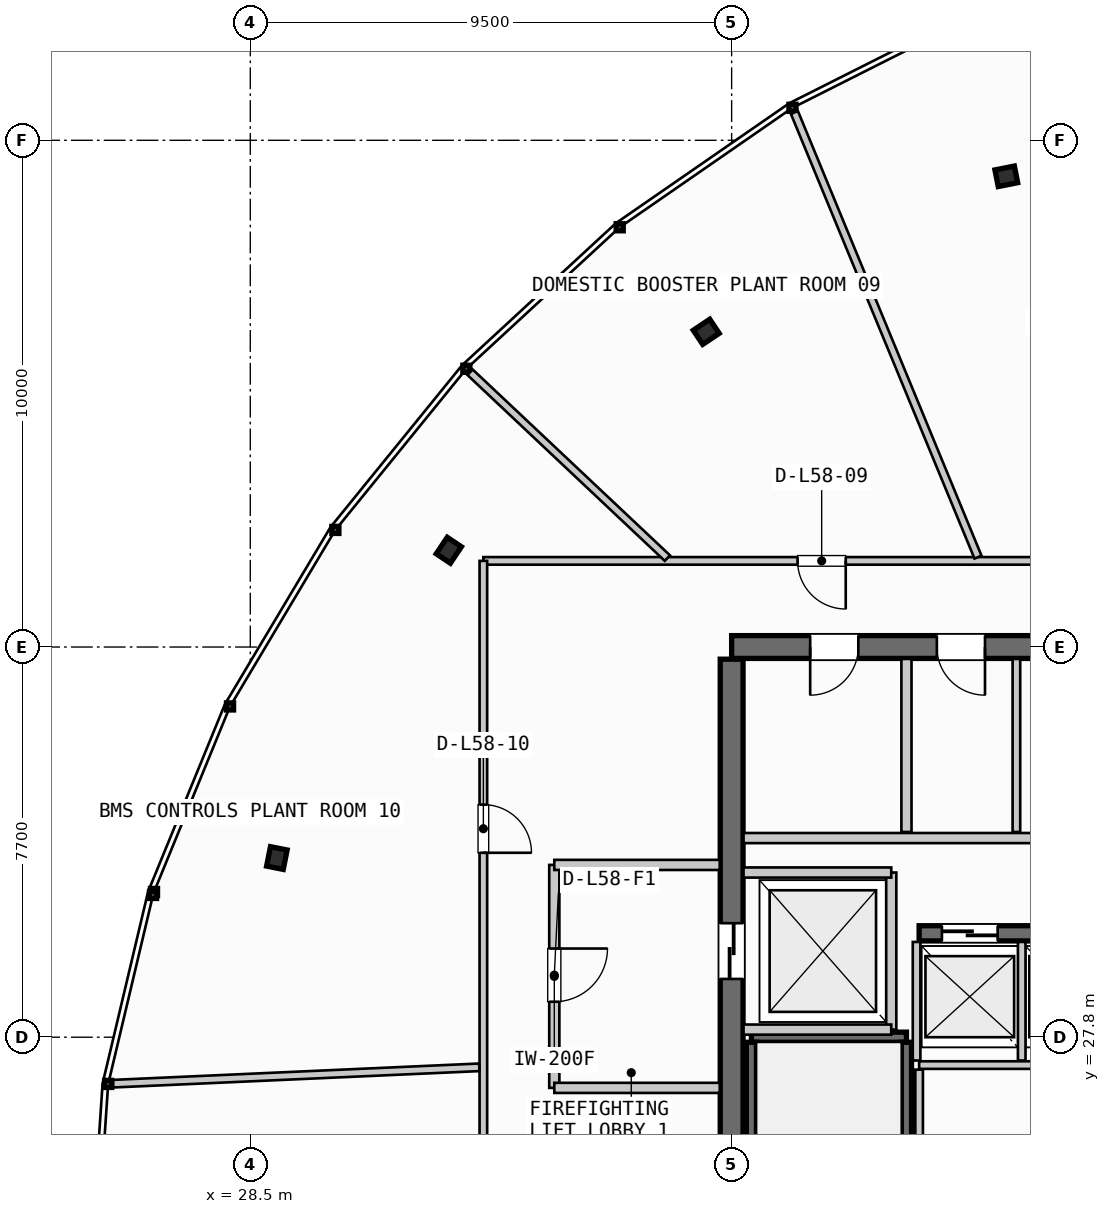
"""IFC4 building model, lengths in metres.
Left out: names, types, materials, properties, quantities, classifications, styles, units other than length and angle.
Written with IfcOpenShell. Run it as: python <this file> out.ifc"""

import sys

from ifc_helpers import new_model, si_unit, direction, frame, frame_2d, origin, origin_2d, place, context, subcontext, project, spatial, rectangle, i_section, extrude, source, transform, mapped, element, fill, save


model = new_model("IFC4")
c1 = context("Model", 3, precision=1e-05, world=origin(), true_north=direction((0.0, 1.0)))
c2 = subcontext(c1, "Body", "Model", "MODEL_VIEW")
j1 = project(units=[si_unit("LENGTHUNIT", "METRE"), si_unit("PLANEANGLEUNIT", "RADIAN")], contexts=[c1])
p1 = place(None, origin())
s1 = spatial("IfcSite", under=j1, at=p1, CompositionType="ELEMENT")
p2 = place(p1, origin())
s2 = spatial("IfcBuilding", under=s1, at=p2, CompositionType="ELEMENT")
p3 = place(p2, frame((0.0, 0.0, 223.6)))
s3 = spatial("IfcBuildingStorey", under=s2, at=p3, CompositionType="ELEMENT", Elevation=223.6)
p4 = place(p3, frame((55.6, 35.5, 0.0), z_axis=(0.0, 0.0, 1.0), x_axis=(-1.0, 0.0, 0.0)))
e1 = element("IfcWall", 1, at=p4, inside=s3, PredefinedType="SHEAR", context=c2, shape_type="SweptSolid", body=[
    extrude(rectangle(XDim=17.6, YDim=0.45, at=frame_2d((8.8, 0.0))), origin(), (0.0, 0.0, 1.0), 4.38),
])
p5 = place(p4, frame((8.05, 0.0, 0.0)))
e2 = element("IfcOpeningElement", 2, at=p5, cuts=e1, PredefinedType="OPENING", context=c2, shape_type="SweptSolid", body=[
    extrude(rectangle(XDim=1.5, YDim=2.2, at=frame_2d((0.75, 1.1))), frame((0.0, 0.235, 0.0), z_axis=(0.0, -1.0, 0.0), x_axis=(1.0, 0.0, 0.0)), (0.0, 0.0, 1.0), 0.47),
])
p6 = place(p4, frame((15.1, 0.0, 0.0)))
e3 = element("IfcOpeningElement", 3, at=p6, cuts=e1, PredefinedType="OPENING", context=c2, shape_type="SweptSolid", body=[
    extrude(rectangle(XDim=0.95, YDim=2.15, at=frame_2d((0.475, 1.075))), frame((0.0, 0.235, 0.0), z_axis=(0.0, -1.0, 0.0), x_axis=(1.0, 0.0, 0.0)), (0.0, 0.0, 1.0), 0.47),
])
p7 = place(p4, frame((12.6, 0.0, 0.0)))
e4 = element("IfcOpeningElement", 4, at=p7, cuts=e1, PredefinedType="OPENING", context=c2, shape_type="SweptSolid", body=[
    extrude(rectangle(XDim=0.95, YDim=2.15, at=frame_2d((0.475, 1.075))), frame((0.0, 0.235, 0.0), z_axis=(0.0, -1.0, 0.0), x_axis=(1.0, 0.0, 0.0)), (0.0, 0.0, 1.0), 0.47),
])
p8 = place(p4, frame((10.45, 0.0, 0.0)))
e5 = element("IfcOpeningElement", 5, at=p8, cuts=e1, PredefinedType="OPENING", context=c2, shape_type="SweptSolid", body=[
    extrude(rectangle(XDim=0.95, YDim=2.15, at=frame_2d((0.475, 1.075))), frame((0.0, 0.235, 0.0), z_axis=(0.0, -1.0, 0.0), x_axis=(1.0, 0.0, 0.0)), (0.0, 0.0, 1.0), 0.47),
])
p9 = place(p3, frame((38.0, 35.26, 0.0), z_axis=(0.0, 0.0, 1.0), x_axis=(0.0, -1.0, 0.0)))
e6 = element("IfcWall", 6, at=p9, inside=s3, PredefinedType="SHEAR", context=c2, shape_type="SweptSolid", body=[
    extrude(rectangle(XDim=14.92, YDim=0.45, at=frame_2d((7.46, 0.0))), origin(), (0.0, 0.0, 1.0), 4.38),
])
p10 = place(p9, frame((5.21, 0.0, 0.0)))
e7 = element("IfcOpeningElement", 7, at=p10, cuts=e6, PredefinedType="OPENING", context=c2, shape_type="SweptSolid", body=[
    extrude(rectangle(XDim=1.1, YDim=2.2, at=frame_2d((0.55, 1.1))), frame((0.0, 0.235, 0.0), z_axis=(0.0, -1.0, 0.0), x_axis=(1.0, 0.0, 0.0)), (0.0, 0.0, 1.0), 0.47),
])
p11 = place(p3, frame((41.7, 29.85, 0.0), z_axis=(0.0, 0.0, 1.0), x_axis=(1.0, 0.0, 0.0)))
e8 = element("IfcWall", 8, at=p11, inside=s3, PredefinedType="SHEAR", context=c2, shape_type="SweptSolid", body=[
    extrude(rectangle(XDim=4.25, YDim=0.3, at=frame_2d((2.125, 0.0))), origin(), (0.0, 0.0, 1.0), 4.38),
])
p12 = place(p11, frame((0.45, 0.0, 0.0)))
e9 = element("IfcOpeningElement", 9, at=p12, cuts=e8, PredefinedType="OPENING", context=c2, shape_type="SweptSolid", body=[
    extrude(rectangle(XDim=1.1, YDim=2.2, at=frame_2d((0.55, 1.1))), frame((0.0, 0.16, 0.0), z_axis=(0.0, -1.0, 0.0), x_axis=(1.0, 0.0, 0.0)), (0.0, 0.0, 1.0), 0.32),
])
p13 = place(p11, frame((2.5, 0.0, 0.0)))
e10 = element("IfcOpeningElement", 10, at=p13, cuts=e8, PredefinedType="OPENING", context=c2, shape_type="SweptSolid", body=[
    extrude(rectangle(XDim=1.1, YDim=2.2, at=frame_2d((0.55, 1.1))), frame((0.0, 0.16, 0.0), z_axis=(0.0, -1.0, 0.0), x_axis=(1.0, 0.0, 0.0)), (0.0, 0.0, 1.0), 0.32),
])
m1 = source(origin(), c2, "Body", "SweptSolid", [
    extrude(i_section(OverallWidth=0.391, OverallDepth=0.335, WebThickness=0.023, FlangeThickness=0.034, FilletRadius=0.015, at=origin_2d()), origin(), (0.0, 0.0, 1.0), 4.38),
])
for number, where, z_axis, x_axis in (
    (11, (43.421, 44.789, 0.0), (0.0, 0.0, 1.0), (-0.195, 0.981, 0.0)),
    (12, (37.499, 41.72, 0.0), (0.0, 0.0, 1.0), (-0.556, 0.831, 0.0)),
    (13, (32.418, 37.409, 0.0), (0.0, 0.0, 1.0), (-0.831, 0.556, 0.0)),
    (14, (29.025, 31.336, 0.0), (0.0, 0.0, 1.0), (-0.981, 0.195, 0.0)),
):
    element("IfcColumn", number, at=place(p3, frame(where, z_axis=z_axis, x_axis=x_axis)), inside=s3, PredefinedType="COLUMN", context=c2, shape_type="MappedRepresentation", body=[
        mapped(m1, transform((0.0, 0.0, 0.0), scale=1.0)),
    ])
p14 = place(p3, frame((38.39, 27.8, 0.0), z_axis=(0.0, 0.0, 1.0), x_axis=(1.0, 0.0, 0.0)))
e15 = element("IfcWall", 15, at=p14, inside=s3, PredefinedType="SHEAR", context=c2, shape_type="SweptSolid", body=[
    extrude(rectangle(XDim=3.06, YDim=0.2, at=frame_2d((1.53, 0.0))), origin(), (0.0, 0.0, 1.0), 4.38),
])
for number, where, z_axis, x_axis in (
    (16, (41.45, 27.7, 0.0), (0.0, 0.0, 1.0), (0.0, -1.0, 0.0)),
    (17, (38.39, 20.35, 0.0), (0.0, 0.0, 1.0), (0.0, 1.0, 0.0)),
):
    element("IfcWall", number, at=place(p3, frame(where, z_axis=z_axis, x_axis=x_axis)), inside=s3, PredefinedType="SHEAR", context=c2, shape_type="SweptSolid", body=[
        extrude(rectangle(XDim=7.35, YDim=0.2, at=frame_2d((3.675, 0.0))), origin(), (0.0, 0.0, 1.0), 4.38),
    ])
p15 = place(p3, frame((41.15, 27.95, 0.0), z_axis=(0.0, 0.0, 1.0), x_axis=(0.0, 1.0, 0.0)))
e18 = element("IfcWall", 18, at=p15, inside=s3, PredefinedType="PARTITIONING", context=c2, shape_type="SweptSolid", body=[
    extrude(rectangle(XDim=3.1, YDim=0.2, at=frame_2d((1.55, 0.0))), origin(), (0.0, 0.0, 1.0), 2.455),
])
for number, where, z_axis, x_axis in (
    (19, (38.235, 27.95, 0.0), (0.0, 0.0, 1.0), (1.0, 0.0, 0.0)),
    (20, (38.235, 31.05, 0.0), (0.0, 0.0, 1.0), (1.0, 0.0, 0.0)),
):
    element("IfcWall", number, at=place(p3, frame(where, z_axis=z_axis, x_axis=x_axis)), inside=s3, PredefinedType="PARTITIONING", context=c2, shape_type="SweptSolid", body=[
        extrude(rectangle(XDim=2.915, YDim=0.2, at=frame_2d((1.458, 0.0))), origin(), (0.0, 0.0, 1.0), 2.455),
    ])
p16 = place(p3, frame((34.5, 31.2, 0.0), z_axis=(0.0, 0.0, 1.0), x_axis=(0.0, -1.0, 0.0)))
e21 = element("IfcWall", 21, at=p16, inside=s3, PredefinedType="PARTITIONING", context=c2, shape_type="SweptSolid", body=[
    extrude(rectangle(XDim=4.4, YDim=0.2, at=frame_2d((2.2, 0.0))), origin(), (0.0, 0.0, 1.0), 2.455),
])
p17 = place(p16, frame((1.65, 0.0, 0.0)))
e22 = element("IfcOpeningElement", 22, at=p17, cuts=e21, PredefinedType="OPENING", context=c2, shape_type="SweptSolid", body=[
    extrude(rectangle(XDim=1.05, YDim=2.15, at=frame_2d((0.525, 1.075))), frame((0.0, 0.11, 0.0), z_axis=(0.0, -1.0, 0.0), x_axis=(1.0, 0.0, 0.0)), (0.0, 0.0, 1.0), 0.22),
])
for number, where, z_axis, x_axis in (
    (23, (34.5, 26.8, 0.0), (0.0, 0.0, 1.0), (1.0, 0.0, 0.0)),
    (24, (34.5, 31.2, 0.0), (0.0, 0.0, 1.0), (1.0, 0.0, 0.0)),
):
    element("IfcWall", number, at=place(p3, frame(where, z_axis=z_axis, x_axis=x_axis)), inside=s3, PredefinedType="PARTITIONING", context=c2, shape_type="SweptSolid", body=[
        extrude(rectangle(XDim=3.265, YDim=0.2, at=frame_2d((1.632, 0.0))), origin(), (0.0, 0.0, 1.0), 2.455),
    ])
p18 = place(p3, frame((41.7, 27.25, 0.0), z_axis=(0.0, 0.0, 1.0), x_axis=(1.0, 0.0, 0.0)))
e25 = element("IfcWall", 25, at=p18, inside=s3, PredefinedType="PARTITIONING", context=c2, shape_type="SweptSolid", body=[
    extrude(rectangle(XDim=4.25, YDim=0.15, at=frame_2d((2.125, 0.0))), origin(), (0.0, 0.0, 1.0), 2.455),
])
p19 = place(p3, frame((41.7, 24.92, 0.0), z_axis=(0.0, 0.0, 1.0), x_axis=(0.0, 1.0, 0.0)))
e26 = element("IfcWall", 26, at=p19, inside=s3, PredefinedType="PARTITIONING", context=c2, shape_type="SweptSolid", body=[
    extrude(rectangle(XDim=2.24, YDim=0.15, at=frame_2d((1.12, 0.0))), origin(), (0.0, 0.0, 1.0), 2.455),
])
for number, where, z_axis, x_axis in (
    (27, (41.65, 27.34, 0.0), (0.0, 0.0, 1.0), (0.0, 1.0, 0.0)),
    (28, (43.725, 27.34, 0.0), (0.0, 0.0, 1.0), (0.0, 1.0, 0.0)),
):
    element("IfcWall", number, at=place(p3, frame(where, z_axis=z_axis, x_axis=x_axis)), inside=s3, PredefinedType="PARTITIONING", context=c2, shape_type="SweptSolid", body=[
        extrude(rectangle(XDim=2.34, YDim=0.15, at=frame_2d((1.17, 0.0))), origin(), (0.0, 0.0, 1.0), 2.455),
    ])
p20 = place(p3, frame((41.45, 31.85, 0.0), z_axis=(0.0, 0.0, 1.0), x_axis=(0.0, 1.0, 0.0)))
e29 = element("IfcWall", 29, at=p20, inside=s3, PredefinedType="PARTITIONING", context=c2, shape_type="SweptSolid", body=[
    extrude(rectangle(XDim=3.415, YDim=0.2, at=frame_2d((1.708, 0.0))), origin(), (0.0, 0.0, 1.0), 2.455),
])
p21 = place(p3, frame((38.235, 31.73, 0.0), z_axis=(0.0, 0.0, 1.0), x_axis=(1.0, 0.0, 0.0)))
e30 = element("IfcWall", 30, at=p21, inside=s3, PredefinedType="PARTITIONING", context=c2, shape_type="SweptSolid", body=[
    extrude(rectangle(XDim=7.565, YDim=0.2, at=frame_2d((3.782, 0.0))), origin(), (0.0, 0.0, 1.0), 2.455),
])
p22 = place(p3, frame((43.62, 31.85, 0.0), z_axis=(0.0, 0.0, 1.0), x_axis=(0.0, 1.0, 0.0)))
e31 = element("IfcWall", 31, at=p22, inside=s3, PredefinedType="PLUMBINGWALL", context=c2, shape_type="SweptSolid", body=[
    extrude(rectangle(XDim=3.415, YDim=0.15, at=frame_2d((1.708, 0.0))), origin(), (0.0, 0.0, 1.0), 2.455),
])
p23 = place(p3, frame((60.5, 37.2, 0.0), z_axis=(0.0, 0.0, 1.0), x_axis=(-1.0, 0.0, 0.0)))
e32 = element("IfcWall", 32, at=p23, inside=s3, PredefinedType="PARTITIONING", context=c2, shape_type="SweptSolid", body=[
    extrude(rectangle(XDim=27.4, YDim=0.15, at=frame_2d((13.7, 0.0))), origin(), (0.0, 0.0, 1.0), 2.455),
])
p24 = place(p23, frame((4.218, 0.0, 0.0)))
e33 = element("IfcOpeningElement", 33, at=p24, cuts=e32, PredefinedType="OPENING", context=c2, shape_type="SweptSolid", body=[
    extrude(rectangle(XDim=0.95, YDim=2.15, at=frame_2d((0.475, 1.075))), frame((0.0, 0.085, 0.0), z_axis=(0.0, -1.0, 0.0), x_axis=(1.0, 0.0, 0.0)), (0.0, 0.0, 1.0), 0.17),
])
p25 = place(p23, frame((12.726, 0.0, 0.0)))
e34 = element("IfcOpeningElement", 34, at=p25, cuts=e32, PredefinedType="OPENING", context=c2, shape_type="SweptSolid", body=[
    extrude(rectangle(XDim=0.95, YDim=2.15, at=frame_2d((0.475, 1.075))), frame((0.0, 0.085, 0.0), z_axis=(0.0, -1.0, 0.0), x_axis=(1.0, 0.0, 0.0)), (0.0, 0.0, 1.0), 0.17),
])
p26 = place(p23, frame((20.248, 0.0, 0.0)))
e35 = element("IfcOpeningElement", 35, at=p26, cuts=e32, PredefinedType="OPENING", context=c2, shape_type="SweptSolid", body=[
    extrude(rectangle(XDim=0.95, YDim=2.15, at=frame_2d((0.475, 1.075))), frame((0.0, 0.085, 0.0), z_axis=(0.0, -1.0, 0.0), x_axis=(1.0, 0.0, 0.0)), (0.0, 0.0, 1.0), 0.17),
])
p27 = place(p3, frame((33.1, 37.2, 0.0), z_axis=(0.0, 0.0, 1.0), x_axis=(0.0, -1.0, 0.0)))
e36 = element("IfcWall", 36, at=p27, inside=s3, PredefinedType="PARTITIONING", context=c2, shape_type="SweptSolid", body=[
    extrude(rectangle(XDim=18.8, YDim=0.15, at=frame_2d((9.4, 0.0))), origin(), (0.0, 0.0, 1.0), 2.455),
])
p28 = place(p27, frame((13.63, 0.0, 0.0)))
e37 = element("IfcOpeningElement", 37, at=p28, cuts=e36, PredefinedType="OPENING", context=c2, shape_type="SweptSolid", body=[
    extrude(rectangle(XDim=0.95, YDim=2.15, at=frame_2d((0.475, 1.075))), frame((0.0, 0.085, 0.0), z_axis=(0.0, -1.0, 0.0), x_axis=(1.0, 0.0, 0.0)), (0.0, 0.0, 1.0), 0.17),
])
p29 = place(p27, frame((4.81, 0.0, 0.0)))
e38 = element("IfcOpeningElement", 38, at=p29, cuts=e36, PredefinedType="OPENING", context=c2, shape_type="SweptSolid", body=[
    extrude(rectangle(XDim=0.95, YDim=2.15, at=frame_2d((0.475, 1.075))), frame((0.0, 0.085, 0.0), z_axis=(0.0, -1.0, 0.0), x_axis=(1.0, 0.0, 0.0)), (0.0, 0.0, 1.0), 0.17),
])
p30 = place(p3, frame((33.02, 27.206, 0.0), z_axis=(0.0, 0.0, 1.0), x_axis=(-0.999000719798, -0.04469409181, 0.0)))
e39 = element("IfcWall", 39, at=p30, inside=s3, PredefinedType="PARTITIONING", context=c2, shape_type="SweptSolid", body=[
    extrude(rectangle(XDim=7.232, YDim=0.15, at=frame_2d((3.616, 0.0))), origin(), (0.0, 0.0, 1.0), 2.455),
])
p31 = place(p3, frame((42.862, 37.274, 0.0), z_axis=(0.0, 0.0, 1.0), x_axis=(-0.381658905652, 0.924303240142, 0.0)))
e40 = element("IfcWall", 40, at=p31, inside=s3, PredefinedType="PARTITIONING", context=c2, shape_type="SweptSolid", body=[
    extrude(rectangle(XDim=9.494, YDim=0.15, at=frame_2d((4.747, 0.0))), origin(), (0.0, 0.0, 1.0), 2.455),
])
p32 = place(p3, frame((36.732, 37.255, 0.0), z_axis=(0.0, 0.0, 1.0), x_axis=(-0.727965481636, 0.68561378162, 0.0)))
e41 = element("IfcWall", 41, at=p32, inside=s3, PredefinedType="PARTITIONING", context=c2, shape_type="SweptSolid", body=[
    extrude(rectangle(XDim=5.35, YDim=0.15, at=frame_2d((2.675, 0.0))), origin(), (0.0, 0.0, 1.0), 2.455),
])
m2 = source(origin(), c2, "Body", "SweptSolid", [
    extrude(rectangle(XDim=1.1, YDim=2.2, at=frame_2d((0.55, 1.1))), frame((0.0, 0.025, 0.0), z_axis=(0.0, -1.0, 0.0), x_axis=(1.0, 0.0, 0.0)), (0.0, 0.0, 1.0), 0.05),
])
p33 = place(p10, origin())
e42 = element("IfcDoor", 42, at=p33, inside=s3, OperationType="SLIDING_TO_LEFT", PredefinedType="DOOR", context=c2, shape_type="MappedRepresentation", body=[
    mapped(m2, transform((0.0, 0.0, 0.0), scale=1.0)),
])
fill(e7, e42)
p34 = place(p12, origin())
e43 = element("IfcDoor", 43, at=p34, inside=s3, OperationType="SLIDING_TO_LEFT", PredefinedType="DOOR", context=c2, shape_type="MappedRepresentation", body=[
    mapped(m2, transform((0.0, 0.0, 0.0), scale=1.0)),
])
fill(e9, e43)
m3 = source(origin(), c2, "Body", "SweptSolid", [
    extrude(rectangle(XDim=0.95, YDim=2.15, at=frame_2d((0.475, 1.075))), frame((0.0, 0.025, 0.0), z_axis=(0.0, -1.0, 0.0), x_axis=(1.0, 0.0, 0.0)), (0.0, 0.0, 1.0), 0.05),
])
p35 = place(p6, origin())
e44 = element("IfcDoor", 44, at=p35, inside=s3, OperationType="SINGLE_SWING_RIGHT", PredefinedType="DOOR", context=c2, shape_type="MappedRepresentation", body=[
    mapped(m3, transform((0.0, 0.0, 0.0), scale=1.0)),
])
fill(e3, e44)
p36 = place(p7, origin())
e45 = element("IfcDoor", 45, at=p36, inside=s3, OperationType="SINGLE_SWING_LEFT", PredefinedType="DOOR", context=c2, shape_type="MappedRepresentation", body=[
    mapped(m3, transform((0.0, 0.0, 0.0), scale=1.0)),
])
fill(e4, e45)
m4 = source(origin(), c2, "Body", "SweptSolid", [
    extrude(rectangle(XDim=1.05, YDim=2.15, at=frame_2d((0.525, 1.075))), frame((0.0, 0.025, 0.0), z_axis=(0.0, -1.0, 0.0), x_axis=(1.0, 0.0, 0.0)), (0.0, 0.0, 1.0), 0.05),
])
p37 = place(p17, origin())
e46 = element("IfcDoor", 46, at=p37, inside=s3, OperationType="SINGLE_SWING_LEFT", PredefinedType="DOOR", context=c2, shape_type="MappedRepresentation", body=[
    mapped(m4, transform((0.0, 0.0, 0.0), scale=1.0)),
])
fill(e22, e46)
p38 = place(p26, origin())
e47 = element("IfcDoor", 47, at=p38, inside=s3, OperationType="SINGLE_SWING_LEFT", PredefinedType="DOOR", context=c2, shape_type="MappedRepresentation", body=[
    mapped(m3, transform((0.0, 0.0, 0.0), scale=1.0)),
])
fill(e35, e47)
p39 = place(p29, origin())
e48 = element("IfcDoor", 48, at=p39, inside=s3, OperationType="SINGLE_SWING_RIGHT", PredefinedType="DOOR", context=c2, shape_type="MappedRepresentation", body=[
    mapped(m3, transform((0.0, 0.0, 0.0), scale=1.0)),
])
fill(e38, e48)
save(model, sys.argv[1])
